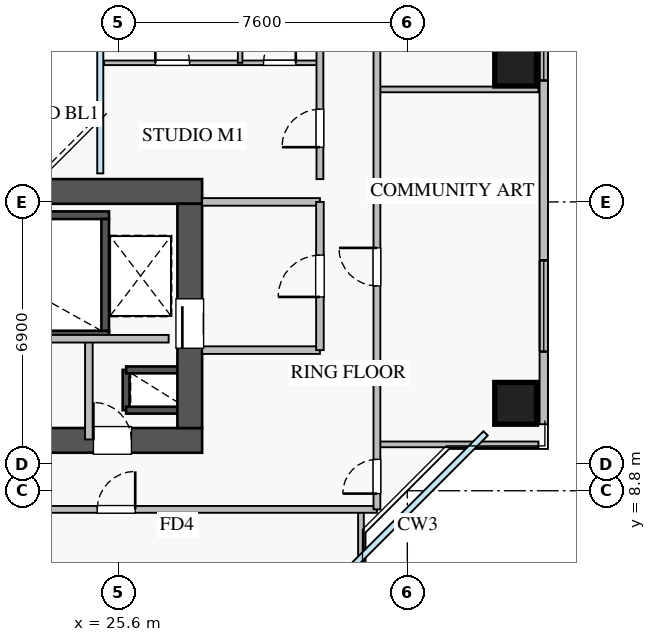
"""IFC4 building model, lengths in metres.
Left out: names, types, materials, properties, quantities, classifications, styles, units other than length and angle.
Written with IfcOpenShell. Run it as: python <this file> out.ifc"""

import sys

from ifc_helpers import new_model, si_unit, direction, frame, frame_2d, origin, origin_2d, place, context, subcontext, project, spatial, rectangle, extrude, source, transform, mapped, element, fill, save


model = new_model("IFC4")
c1 = context("Model", 3, precision=1e-05, world=origin(), true_north=direction((0.0, 1.0)))
c2 = subcontext(c1, "Body", "Model", "MODEL_VIEW")
j1 = project(units=[si_unit("LENGTHUNIT", "METRE"), si_unit("PLANEANGLEUNIT", "RADIAN")], contexts=[c1])
p1 = place(None, origin())
s1 = spatial("IfcSite", under=j1, at=p1, CompositionType="ELEMENT")
p2 = place(p1, origin())
s2 = spatial("IfcBuilding", under=s1, at=p2, CompositionType="ELEMENT")
p3 = place(p2, frame((0.0, 0.0, 97.0)))
s3 = spatial("IfcBuildingStorey", under=s2, at=p3, CompositionType="ELEMENT", Elevation=97.0)
p4 = place(p3, frame((25.8, 10.92, 0.0), z_axis=(0.0, 0.0, 1.0), x_axis=(0.0, 1.0, 0.0)))
e1 = element("IfcWall", 1, at=p4, inside=s3, PredefinedType="SHEAR", context=c2, shape_type="SweptSolid", body=[
    extrude(rectangle(XDim=1.06, YDim=0.18, at=frame_2d((0.53, 0.0))), origin(), (0.0, 0.0, 1.0), 3.07),
])
for number, where, z_axis, x_axis in (
    (2, (25.8, 11.98, 0.0), (0.0, 0.0, 1.0), (1.0, 0.0, 0.0)),
    (3, (25.8, 10.92, 0.0), (0.0, 0.0, 1.0), (1.0, 0.0, 0.0)),
):
    element("IfcWall", number, at=place(p3, frame(where, z_axis=z_axis, x_axis=x_axis)), inside=s3, PredefinedType="SHEAR", context=c2, shape_type="SweptSolid", body=[
        extrude(rectangle(XDim=1.35, YDim=0.18, at=frame_2d((0.675, 0.0))), origin(), (0.0, 0.0, 1.0), 3.07),
    ])
p5 = place(p3, frame((18.2, 12.91, 0.0), z_axis=(0.0, 0.0, 1.0), x_axis=(1.0, 0.0, 0.0)))
e4 = element("IfcWall", 4, at=p5, inside=s3, PredefinedType="SHEAR", context=c2, shape_type="SweptSolid", body=[
    extrude(rectangle(XDim=7.15, YDim=0.2, at=frame_2d((3.575, 0.0))), origin(), (0.0, 0.0, 1.0), 3.25),
])
p6 = place(p5, frame((0.35, 0.0, 0.0)))
e5 = element("IfcOpeningElement", 5, at=p6, cuts=e4, PredefinedType="OPENING", context=c2, shape_type="SweptSolid", body=[
    extrude(rectangle(XDim=1.1, YDim=2.05, at=frame_2d((0.55, 1.025))), frame((0.0, 0.11, 0.0), z_axis=(0.0, -1.0, 0.0), x_axis=(1.0, 0.0, 0.0)), (0.0, 0.0, 1.0), 0.22),
])
p7 = place(p3, frame((18.2, 16.05, 0.0), z_axis=(0.0, 0.0, 1.0), x_axis=(1.0, 0.0, 0.0)))
e6 = element("IfcWall", 6, at=p7, inside=s3, PredefinedType="SHEAR", context=c2, shape_type="SweptSolid", body=[
    extrude(rectangle(XDim=7.15, YDim=0.2, at=frame_2d((3.575, 0.0))), origin(), (0.0, 0.0, 1.0), 3.25),
])
p8 = place(p3, frame((25.25, 13.01, 0.0), z_axis=(0.0, 0.0, 1.0), x_axis=(0.0, 1.0, 0.0)))
e7 = element("IfcWall", 7, at=p8, inside=s3, PredefinedType="SHEAR", context=c2, shape_type="SweptSolid", body=[
    extrude(rectangle(XDim=2.94, YDim=0.2, at=frame_2d((1.47, 0.0))), origin(), (0.0, 0.0, 1.0), 3.25),
])
p9 = place(p3, frame((10.2, 10.125, 0.0), z_axis=(0.0, 0.0, 1.0), x_axis=(1.0, 0.0, 0.0)))
e8 = element("IfcWall", 8, at=p9, inside=s3, PredefinedType="SHEAR", context=c2, shape_type="SweptSolid", body=[
    extrude(rectangle(XDim=17.6, YDim=0.65, at=frame_2d((8.8, 0.0))), origin(), (0.0, 0.0, 1.0), 3.25),
])
p10 = place(p9, frame((1.15, 0.0, 0.0)))
e9 = element("IfcOpeningElement", 9, at=p10, cuts=e8, PredefinedType="OPENING", context=c2, shape_type="SweptSolid", body=[
    extrude(rectangle(XDim=1.1, YDim=2.05, at=frame_2d((0.55, 1.025))), frame((0.0, 0.335, 0.0), z_axis=(0.0, -1.0, 0.0), x_axis=(1.0, 0.0, 0.0)), (0.0, 0.0, 1.0), 0.67),
])
p11 = place(p9, frame((8.3, 0.0, 0.0)))
e10 = element("IfcOpeningElement", 10, at=p11, cuts=e8, PredefinedType="OPENING", context=c2, shape_type="SweptSolid", body=[
    extrude(rectangle(XDim=1.1, YDim=2.05, at=frame_2d((0.55, 1.025))), frame((0.0, 0.335, 0.0), z_axis=(0.0, -1.0, 0.0), x_axis=(1.0, 0.0, 0.0)), (0.0, 0.0, 1.0), 0.67),
])
p12 = place(p9, frame((4.9, 0.0, 0.0)))
e11 = element("IfcOpeningElement", 11, at=p12, cuts=e8, PredefinedType="OPENING", context=c2, shape_type="SweptSolid", body=[
    extrude(rectangle(XDim=1.1, YDim=2.05, at=frame_2d((0.55, 1.025))), frame((0.0, 0.335, 0.0), z_axis=(0.0, -1.0, 0.0), x_axis=(1.0, 0.0, 0.0)), (0.0, 0.0, 1.0), 0.67),
])
p13 = place(p9, frame((14.74, 0.0, 0.0)))
e12 = element("IfcOpeningElement", 12, at=p13, cuts=e8, PredefinedType="OPENING", context=c2, shape_type="SweptSolid", body=[
    extrude(rectangle(XDim=1.0, YDim=2.05, at=frame_2d((0.5, 1.025))), frame((0.0, 0.335, 0.0), z_axis=(0.0, -1.0, 0.0), x_axis=(1.0, 0.0, 0.0)), (0.0, 0.0, 1.0), 0.67),
])
p14 = place(p9, frame((11.67, 0.0, 0.0)))
e13 = element("IfcOpeningElement", 13, at=p14, cuts=e8, PredefinedType="OPENING", context=c2, shape_type="SweptSolid", body=[
    extrude(rectangle(XDim=1.0, YDim=2.05, at=frame_2d((0.5, 1.025))), frame((0.0, 0.335, 0.0), z_axis=(0.0, -1.0, 0.0), x_axis=(1.0, 0.0, 0.0)), (0.0, 0.0, 1.0), 0.67),
])
p15 = place(p3, frame((10.2, 16.675, 0.0), z_axis=(0.0, 0.0, 1.0), x_axis=(1.0, 0.0, 0.0)))
e14 = element("IfcWall", 14, at=p15, inside=s3, PredefinedType="SHEAR", context=c2, shape_type="SweptSolid", body=[
    extrude(rectangle(XDim=17.6, YDim=0.65, at=frame_2d((8.8, 0.0))), origin(), (0.0, 0.0, 1.0), 3.25),
])
p16 = place(p3, frame((27.475, 10.45, 0.0), z_axis=(0.0, 0.0, 1.0), x_axis=(0.0, 1.0, 0.0)))
e15 = element("IfcWall", 15, at=p16, inside=s3, PredefinedType="SHEAR", context=c2, shape_type="SweptSolid", body=[
    extrude(rectangle(XDim=5.9, YDim=0.65, at=frame_2d((2.95, 0.0))), origin(), (0.0, 0.0, 1.0), 3.25),
])
p17 = place(p16, frame((2.1, 0.0, 0.0)))
e16 = element("IfcOpeningElement", 16, at=p17, cuts=e15, PredefinedType="OPENING", context=c2, shape_type="SweptSolid", body=[
    extrude(rectangle(XDim=1.3, YDim=2.05, at=frame_2d((0.65, 1.025))), frame((0.0, 0.335, 0.0), z_axis=(0.0, -1.0, 0.0), x_axis=(1.0, 0.0, 0.0)), (0.0, 0.0, 1.0), 0.67),
])
m1 = source(origin(), c2, "Body", "SweptSolid", [
    extrude(rectangle(XDim=1.1, YDim=1.1, at=origin_2d()), origin(), (0.0, 0.0, 1.0), 3.25),
])
for number, where, z_axis, x_axis in (
    (17, (36.05, 11.1, 0.0), (0.0, 0.0, 1.0), (1.0, 0.0, 0.0)),
    (18, (36.05, 20.0, 0.0), (0.0, 0.0, 1.0), (1.0, 0.0, 0.0)),
):
    element("IfcColumn", number, at=place(p3, frame(where, z_axis=z_axis, x_axis=x_axis)), inside=s3, PredefinedType="COLUMN", context=c2, shape_type="MappedRepresentation", body=[
        mapped(m1, transform((0.0, 0.0, 0.0), x_axis=(1.0, 0.0, 0.0), y_axis=(0.0, 1.0, 0.0), z_axis=(0.0, 0.0, 1.0), scale=1.0)),
    ])
p18 = place(p3, frame((36.79, 10.55, 0.0), z_axis=(0.0, 0.0, 1.0), x_axis=(0.0, 1.0, 0.0)))
e19 = element("IfcWall", 19, at=p18, inside=s3, PredefinedType="STANDARD", context=c2, shape_type="SweptSolid", body=[
    extrude(rectangle(XDim=24.9, YDim=0.22, at=frame_2d((12.45, 0.0))), origin(), (0.0, 0.0, 1.0), 2.61),
])
p19 = place(p18, frame((1.912, 0.0, 0.9)))
e20 = element("IfcOpeningElement", 20, at=p19, cuts=e19, PredefinedType="OPENING", context=c2, shape_type="SweptSolid", body=[
    extrude(rectangle(XDim=2.4, YDim=1.48, at=frame_2d((1.2, 0.74))), frame((0.0, 0.12, 0.0), z_axis=(0.0, -1.0, 0.0), x_axis=(1.0, 0.0, 0.0)), (0.0, 0.0, 1.0), 0.24),
])
p20 = place(p18, frame((22.165, 0.0, 0.9)))
e21 = element("IfcOpeningElement", 21, at=p20, cuts=e19, PredefinedType="OPENING", context=c2, shape_type="SweptSolid", body=[
    extrude(rectangle(XDim=2.1, YDim=1.5, at=frame_2d((1.05, 0.75))), frame((0.0, 0.12, 0.0), z_axis=(0.0, -1.0, 0.0), x_axis=(1.0, 0.0, 0.0)), (0.0, 0.0, 1.0), 0.24),
])
p21 = place(p18, frame((18.093, 0.0, 0.9)))
e22 = element("IfcOpeningElement", 22, at=p21, cuts=e19, PredefinedType="OPENING", context=c2, shape_type="SweptSolid", body=[
    extrude(rectangle(XDim=2.4, YDim=1.5, at=frame_2d((1.2, 0.75))), frame((0.0, 0.12, 0.0), z_axis=(0.0, -1.0, 0.0), x_axis=(1.0, 0.0, 0.0)), (0.0, 0.0, 1.0), 0.24),
])
p22 = place(p18, frame((9.045, 0.0, 0.9)))
e23 = element("IfcOpeningElement", 23, at=p22, cuts=e19, PredefinedType="OPENING", context=c2, shape_type="SweptSolid", body=[
    extrude(rectangle(XDim=0.9, YDim=1.2, at=frame_2d((0.45, 0.6))), frame((0.0, 0.12, 0.0), z_axis=(0.0, -1.0, 0.0), x_axis=(1.0, 0.0, 0.0)), (0.0, 0.0, 1.0), 0.24),
])
for number, where, z_axis, x_axis in (
    (24, (27.8, 16.4, 0.0), (0.0, 0.0, 1.0), (1.0, 0.0, 0.0)),
    (25, (27.8, 12.5, 0.0), (0.0, 0.0, 1.0), (1.0, 0.0, 0.0)),
):
    element("IfcWall", number, at=place(p3, frame(where, z_axis=z_axis, x_axis=x_axis)), inside=s3, PredefinedType="PARTITIONING", context=c2, shape_type="SweptSolid", body=[
        extrude(rectangle(XDim=3.1, YDim=0.2, at=frame_2d((1.55, 0.0))), origin(), (0.0, 0.0, 1.0), 3.07),
    ])
p23 = place(p3, frame((30.9, 12.5, 0.0), z_axis=(0.0, 0.0, 1.0), x_axis=(0.0, 1.0, 0.0)))
e26 = element("IfcWall", 26, at=p23, inside=s3, PredefinedType="PARTITIONING", context=c2, shape_type="SweptSolid", body=[
    extrude(rectangle(XDim=3.9, YDim=0.2, at=frame_2d((1.95, 0.0))), origin(), (0.0, 0.0, 1.0), 3.07),
])
p24 = place(p23, frame((1.4, 0.0, 0.0)))
e27 = element("IfcOpeningElement", 27, at=p24, cuts=e26, PredefinedType="OPENING", context=c2, shape_type="SweptSolid", body=[
    extrude(rectangle(XDim=1.1, YDim=2.05, at=frame_2d((0.55, 1.025))), frame((0.0, 0.11, 0.0), z_axis=(0.0, -1.0, 0.0), x_axis=(1.0, 0.0, 0.0)), (0.0, 0.0, 1.0), 0.22),
])
p25 = place(p3, frame((24.82, 10.15, 0.0), z_axis=(0.0, 0.0, 1.0), x_axis=(0.0, 1.0, 0.0)))
e28 = element("IfcWall", 28, at=p25, inside=s3, PredefinedType="PARTITIONING", context=c2, shape_type="SweptSolid", body=[
    extrude(rectangle(XDim=2.65, YDim=0.2, at=frame_2d((1.325, 0.0))), origin(), (0.0, 0.0, 1.0), 3.07),
])
p26 = place(p3, frame((21.75, 12.8, 0.0), z_axis=(0.0, 0.0, 1.0), x_axis=(1.0, 0.0, 0.0)))
e29 = element("IfcWall", 29, at=p26, inside=s3, PredefinedType="PARTITIONING", context=c2, shape_type="SweptSolid", body=[
    extrude(rectangle(XDim=5.17, YDim=0.2, at=frame_2d((2.585, 0.0))), origin(), (0.0, 0.0, 1.0), 3.07),
])
p27 = place(p3, frame((31.98, 5.35, 0.0), z_axis=(0.0, 0.0, 1.0), x_axis=(0.0, 1.0, 0.0)))
e30 = element("IfcWall", 30, at=p27, inside=s3, PredefinedType="PARTITIONING", context=c2, shape_type="SweptSolid", body=[
    extrude(rectangle(XDim=2.96, YDim=0.15, at=frame_2d((1.48, 0.0))), origin(), (0.0, 0.0, 1.0), 3.07),
])
p28 = place(p3, frame((8.82, 8.31, 0.0), z_axis=(0.0, 0.0, 1.0), x_axis=(1.0, 0.0, 0.0)))
e31 = element("IfcWall", 31, at=p28, inside=s3, PredefinedType="PARTITIONING", context=c2, shape_type="SweptSolid", body=[
    extrude(rectangle(XDim=23.58, YDim=0.18, at=frame_2d((11.79, 0.0))), origin(), (0.0, 0.0, 1.0), 3.07),
])
p29 = place(p28, frame((4.64, 0.0, 0.0)))
e32 = element("IfcOpeningElement", 32, at=p29, cuts=e31, PredefinedType="OPENING", context=c2, shape_type="SweptSolid", body=[
    extrude(rectangle(XDim=1.0, YDim=2.05, at=frame_2d((0.5, 1.025))), frame((0.0, 0.1, 0.0), z_axis=(0.0, -1.0, 0.0), x_axis=(1.0, 0.0, 0.0)), (0.0, 0.0, 1.0), 0.2),
])
p30 = place(p28, frame((16.22, 0.0, 0.0)))
e33 = element("IfcOpeningElement", 33, at=p30, cuts=e31, PredefinedType="OPENING", context=c2, shape_type="SweptSolid", body=[
    extrude(rectangle(XDim=1.0, YDim=2.05, at=frame_2d((0.5, 1.025))), frame((0.0, 0.1, 0.0), z_axis=(0.0, -1.0, 0.0), x_axis=(1.0, 0.0, 0.0)), (0.0, 0.0, 1.0), 0.2),
])
for number, where, z_axis, x_axis in (
    (34, (32.4, 10.02, 0.0), (0.0, 0.0, 1.0), (1.0, 0.0, 0.0)),
    (35, (32.4, 19.36, 0.0), (0.0, 0.0, 1.0), (1.0, 0.0, 0.0)),
):
    element("IfcWall", number, at=place(p3, frame(where, z_axis=z_axis, x_axis=x_axis)), inside=s3, PredefinedType="PARTITIONING", context=c2, shape_type="SweptSolid", body=[
        extrude(rectangle(XDim=4.25, YDim=0.15, at=frame_2d((2.125, 0.0))), origin(), (0.0, 0.0, 1.0), 3.07),
    ])
p31 = place(p3, frame((32.4, 8.31, 0.0), z_axis=(0.0, 0.0, 1.0), x_axis=(0.0, 1.0, 0.0)))
e36 = element("IfcWall", 36, at=p31, inside=s3, PredefinedType="PARTITIONING", context=c2, shape_type="SweptSolid", body=[
    extrude(rectangle(XDim=29.13, YDim=0.18, at=frame_2d((14.565, 0.0))), origin(), (0.0, 0.0, 1.0), 3.07),
])
p32 = place(p31, frame((27.94, 0.0, 0.0)))
e37 = element("IfcOpeningElement", 37, at=p32, cuts=e36, PredefinedType="OPENING", context=c2, shape_type="SweptSolid", body=[
    extrude(rectangle(XDim=0.9, YDim=2.05, at=frame_2d((0.45, 1.025))), frame((0.0, 0.1, 0.0), z_axis=(0.0, -1.0, 0.0), x_axis=(1.0, 0.0, 0.0)), (0.0, 0.0, 1.0), 0.2),
])
p33 = place(p31, frame((0.415, 0.0, 0.0)))
e38 = element("IfcOpeningElement", 38, at=p33, cuts=e36, PredefinedType="OPENING", context=c2, shape_type="SweptSolid", body=[
    extrude(rectangle(XDim=0.9, YDim=2.05, at=frame_2d((0.45, 1.025))), frame((0.0, 0.1, 0.0), z_axis=(0.0, -1.0, 0.0), x_axis=(1.0, 0.0, 0.0)), (0.0, 0.0, 1.0), 0.2),
])
p34 = place(p31, frame((5.88, 0.0, 0.0)))
e39 = element("IfcOpeningElement", 39, at=p34, cuts=e36, PredefinedType="OPENING", context=c2, shape_type="SweptSolid", body=[
    extrude(rectangle(XDim=1.0, YDim=2.05, at=frame_2d((0.5, 1.025))), frame((0.0, 0.1, 0.0), z_axis=(0.0, -1.0, 0.0), x_axis=(1.0, 0.0, 0.0)), (0.0, 0.0, 1.0), 0.2),
])
p35 = place(p31, frame((12.23, 0.0, 0.0)))
e40 = element("IfcOpeningElement", 40, at=p35, cuts=e36, PredefinedType="OPENING", context=c2, shape_type="SweptSolid", body=[
    extrude(rectangle(XDim=1.0, YDim=2.05, at=frame_2d((0.5, 1.025))), frame((0.0, 0.1, 0.0), z_axis=(0.0, -1.0, 0.0), x_axis=(1.0, 0.0, 0.0)), (0.0, 0.0, 1.0), 0.2),
])
p36 = place(p31, frame((20.835, 0.0, 0.0)))
e41 = element("IfcOpeningElement", 41, at=p36, cuts=e36, PredefinedType="OPENING", context=c2, shape_type="SweptSolid", body=[
    extrude(rectangle(XDim=1.0, YDim=2.05, at=frame_2d((0.5, 1.025))), frame((0.0, 0.1, 0.0), z_axis=(0.0, -1.0, 0.0), x_axis=(1.0, 0.0, 0.0)), (0.0, 0.0, 1.0), 0.2),
])
p37 = place(p3, frame((25.22, 20.06, 0.0), z_axis=(0.0, 0.0, 1.0), x_axis=(1.0, 0.0, 0.0)))
e42 = element("IfcWall", 42, at=p37, inside=s3, PredefinedType="PLUMBINGWALL", context=c2, shape_type="SweptSolid", body=[
    extrude(rectangle(XDim=5.68, YDim=0.12, at=frame_2d((2.84, 0.0))), origin(), (0.0, 0.0, 1.0), 2.625),
])
p38 = place(p37, frame((1.35, 0.0, 0.0)))
e43 = element("IfcOpeningElement", 43, at=p38, cuts=e42, PredefinedType="OPENING", context=c2, shape_type="SweptSolid", body=[
    extrude(rectangle(XDim=0.9, YDim=2.05, at=frame_2d((0.45, 1.025))), frame((0.0, 0.07, 0.0), z_axis=(0.0, -1.0, 0.0), x_axis=(1.0, 0.0, 0.0)), (0.0, 0.0, 1.0), 0.14),
])
p39 = place(p37, frame((4.195, 0.0, 0.0)))
e44 = element("IfcOpeningElement", 44, at=p39, cuts=e42, PredefinedType="OPENING", context=c2, shape_type="SweptSolid", body=[
    extrude(rectangle(XDim=0.85, YDim=2.05, at=frame_2d((0.425, 1.025))), frame((0.0, 0.07, 0.0), z_axis=(0.0, -1.0, 0.0), x_axis=(1.0, 0.0, 0.0)), (0.0, 0.0, 1.0), 0.14),
])
p40 = place(p3, frame((28.8, 20.06, 0.0), z_axis=(0.0, 0.0, 1.0), x_axis=(0.0, 1.0, 0.0)))
e45 = element("IfcWall", 45, at=p40, inside=s3, PredefinedType="PLUMBINGWALL", context=c2, shape_type="SweptSolid", body=[
    extrude(rectangle(XDim=2.61, YDim=0.12, at=frame_2d((1.305, 0.0))), origin(), (0.0, 0.0, 1.0), 3.07),
])
p41 = place(p3, frame((30.9, 17.0, 0.0), z_axis=(0.0, 0.0, 1.0), x_axis=(0.0, 1.0, 0.0)))
e46 = element("IfcWall", 46, at=p41, inside=s3, PredefinedType="PARTITIONING", context=c2, shape_type="SweptSolid", body=[
    extrude(rectangle(XDim=12.0, YDim=0.18, at=frame_2d((6.0, 0.0))), origin(), (0.0, 0.0, 1.0), 3.07),
])
p42 = place(p41, frame((0.84, 0.0, 0.0)))
e47 = element("IfcOpeningElement", 47, at=p42, cuts=e46, PredefinedType="OPENING", context=c2, shape_type="SweptSolid", body=[
    extrude(rectangle(XDim=1.0, YDim=2.05, at=frame_2d((0.5, 1.025))), frame((0.0, 0.1, 0.0), z_axis=(0.0, -1.0, 0.0), x_axis=(1.0, 0.0, 0.0)), (0.0, 0.0, 1.0), 0.2),
])
p43 = place(p41, frame((6.69, 0.0, 0.0)))
e48 = element("IfcOpeningElement", 48, at=p43, cuts=e46, PredefinedType="OPENING", context=c2, shape_type="SweptSolid", body=[
    extrude(rectangle(XDim=1.0, YDim=2.05, at=frame_2d((0.5, 1.025))), frame((0.0, 0.1, 0.0), z_axis=(0.0, -1.0, 0.0), x_axis=(1.0, 0.0, 0.0)), (0.0, 0.0, 1.0), 0.2),
])
m2 = source(origin(), c2, "Body", "SweptSolid", [
    extrude(rectangle(XDim=2.4, YDim=1.48, at=frame_2d((1.2, 0.74))), frame((0.0, 0.03, 0.0), z_axis=(0.0, -1.0, 0.0), x_axis=(1.0, 0.0, 0.0)), (0.0, 0.0, 1.0), 0.06),
])
p44 = place(p19, origin())
e49 = element("IfcWindow", 49, at=p44, inside=s3, PartitioningType="TRIPLE_PANEL_VERTICAL", PredefinedType="WINDOW", context=c2, shape_type="MappedRepresentation", body=[
    mapped(m2, transform((0.0, 0.0, 0.0), x_axis=(1.0, 0.0, 0.0), y_axis=(0.0, 1.0, 0.0), z_axis=(0.0, 0.0, 1.0), scale=1.0)),
])
fill(e20, e49)
m3 = source(origin(), c2, "Body", "SweptSolid", [
    extrude(rectangle(XDim=1.3, YDim=2.05, at=frame_2d((0.65, 1.025))), frame((0.0, 0.025, 0.0), z_axis=(0.0, -1.0, 0.0), x_axis=(1.0, 0.0, 0.0)), (0.0, 0.0, 1.0), 0.05),
])
p45 = place(p17, origin())
e50 = element("IfcDoor", 50, at=p45, inside=s3, OperationType="SLIDING_TO_RIGHT", PredefinedType="DOOR", context=c2, shape_type="MappedRepresentation", body=[
    mapped(m3, transform((0.0, 0.0, 0.0), x_axis=(1.0, 0.0, 0.0), y_axis=(0.0, 1.0, 0.0), z_axis=(0.0, 0.0, 1.0), scale=1.0)),
])
fill(e16, e50)
m4 = source(origin(), c2, "Body", "SweptSolid", [
    extrude(rectangle(XDim=1.0, YDim=2.05, at=frame_2d((0.5, 1.025))), frame((0.0, 0.025, 0.0), z_axis=(0.0, -1.0, 0.0), x_axis=(1.0, 0.0, 0.0)), (0.0, 0.0, 1.0), 0.05),
])
p46 = place(p13, origin())
e51 = element("IfcDoor", 51, at=p46, inside=s3, OperationType="SINGLE_SWING_LEFT", PredefinedType="DOOR", context=c2, shape_type="MappedRepresentation", body=[
    mapped(m4, transform((0.0, 0.0, 0.0), x_axis=(1.0, 0.0, 0.0), y_axis=(0.0, 1.0, 0.0), z_axis=(0.0, 0.0, 1.0), scale=1.0)),
])
fill(e12, e51)
m5 = source(origin(), c2, "Body", "SweptSolid", [
    extrude(rectangle(XDim=1.1, YDim=2.05, at=frame_2d((0.55, 1.025))), frame((0.0, 0.025, 0.0), z_axis=(0.0, -1.0, 0.0), x_axis=(1.0, 0.0, 0.0)), (0.0, 0.0, 1.0), 0.05),
])
p47 = place(p24, origin())
e52 = element("IfcDoor", 52, at=p47, inside=s3, OperationType="SINGLE_SWING_LEFT", PredefinedType="DOOR", context=c2, shape_type="MappedRepresentation", body=[
    mapped(m5, transform((0.0, 0.0, 0.0), x_axis=(1.0, 0.0, 0.0), y_axis=(0.0, 1.0, 0.0), z_axis=(0.0, 0.0, 1.0), scale=1.0)),
])
fill(e27, e52)
p48 = place(p30, origin())
e53 = element("IfcDoor", 53, at=p48, inside=s3, OperationType="SINGLE_SWING_RIGHT", PredefinedType="DOOR", context=c2, shape_type="MappedRepresentation", body=[
    mapped(m4, transform((0.0, 0.0, 0.0), x_axis=(1.0, 0.0, 0.0), y_axis=(0.0, 1.0, 0.0), z_axis=(0.0, 0.0, 1.0), scale=1.0)),
])
fill(e33, e53)
m6 = source(origin(), c2, "Body", "SweptSolid", [
    extrude(rectangle(XDim=0.9, YDim=2.05, at=frame_2d((0.45, 1.025))), frame((0.0, 0.025, 0.0), z_axis=(0.0, -1.0, 0.0), x_axis=(1.0, 0.0, 0.0)), (0.0, 0.0, 1.0), 0.05),
])
p49 = place(p33, origin())
e54 = element("IfcDoor", 54, at=p49, inside=s3, OperationType="SINGLE_SWING_LEFT", PredefinedType="DOOR", context=c2, shape_type="MappedRepresentation", body=[
    mapped(m6, transform((0.0, 0.0, 0.0), x_axis=(1.0, 0.0, 0.0), y_axis=(0.0, 1.0, 0.0), z_axis=(0.0, 0.0, 1.0), scale=1.0)),
])
fill(e38, e54)
p50 = place(p34, origin())
e55 = element("IfcDoor", 55, at=p50, inside=s3, OperationType="SINGLE_SWING_RIGHT", PredefinedType="DOOR", context=c2, shape_type="MappedRepresentation", body=[
    mapped(m4, transform((0.0, 0.0, 0.0), x_axis=(1.0, 0.0, 0.0), y_axis=(0.0, 1.0, 0.0), z_axis=(0.0, 0.0, 1.0), scale=1.0)),
])
fill(e39, e55)
p51 = place(p38, origin())
e56 = element("IfcDoor", 56, at=p51, inside=s3, OperationType="SINGLE_SWING_LEFT", PredefinedType="DOOR", context=c2, shape_type="MappedRepresentation", body=[
    mapped(m6, transform((0.0, 0.0, 0.0), x_axis=(1.0, 0.0, 0.0), y_axis=(0.0, 1.0, 0.0), z_axis=(0.0, 0.0, 1.0), scale=1.0)),
])
fill(e43, e56)
m7 = source(origin(), c2, "Body", "SweptSolid", [
    extrude(rectangle(XDim=0.85, YDim=2.05, at=frame_2d((0.425, 1.025))), frame((0.0, 0.025, 0.0), z_axis=(0.0, -1.0, 0.0), x_axis=(1.0, 0.0, 0.0)), (0.0, 0.0, 1.0), 0.05),
])
p52 = place(p39, origin())
e57 = element("IfcDoor", 57, at=p52, inside=s3, OperationType="SINGLE_SWING_RIGHT", PredefinedType="DOOR", context=c2, shape_type="MappedRepresentation", body=[
    mapped(m7, transform((0.0, 0.0, 0.0), x_axis=(1.0, 0.0, 0.0), y_axis=(0.0, 1.0, 0.0), z_axis=(0.0, 0.0, 1.0), scale=1.0)),
])
fill(e44, e57)
p53 = place(p42, origin())
e58 = element("IfcDoor", 58, at=p53, inside=s3, OperationType="SINGLE_SWING_LEFT", PredefinedType="DOOR", context=c2, shape_type="MappedRepresentation", body=[
    mapped(m4, transform((0.0, 0.0, 0.0), x_axis=(1.0, 0.0, 0.0), y_axis=(0.0, 1.0, 0.0), z_axis=(0.0, 0.0, 1.0), scale=1.0)),
])
fill(e47, e58)
m8 = source(origin(), c2, "Body", "SweptSolid", [
    extrude(rectangle(XDim=0.9, YDim=1.2, at=frame_2d((0.45, 0.6))), frame((0.0, 0.03, 0.0), z_axis=(0.0, -1.0, 0.0), x_axis=(1.0, 0.0, 0.0)), (0.0, 0.0, 1.0), 0.06),
])
p54 = place(p22, origin())
e59 = element("IfcWindow", 59, at=p54, inside=s3, PartitioningType="SINGLE_PANEL", PredefinedType="WINDOW", context=c2, shape_type="MappedRepresentation", body=[
    mapped(m8, transform((0.0, 0.0, 0.0), x_axis=(1.0, 0.0, 0.0), y_axis=(0.0, 1.0, 0.0), z_axis=(0.0, 0.0, 1.0), scale=1.0)),
])
fill(e23, e59)
save(model, sys.argv[1])
